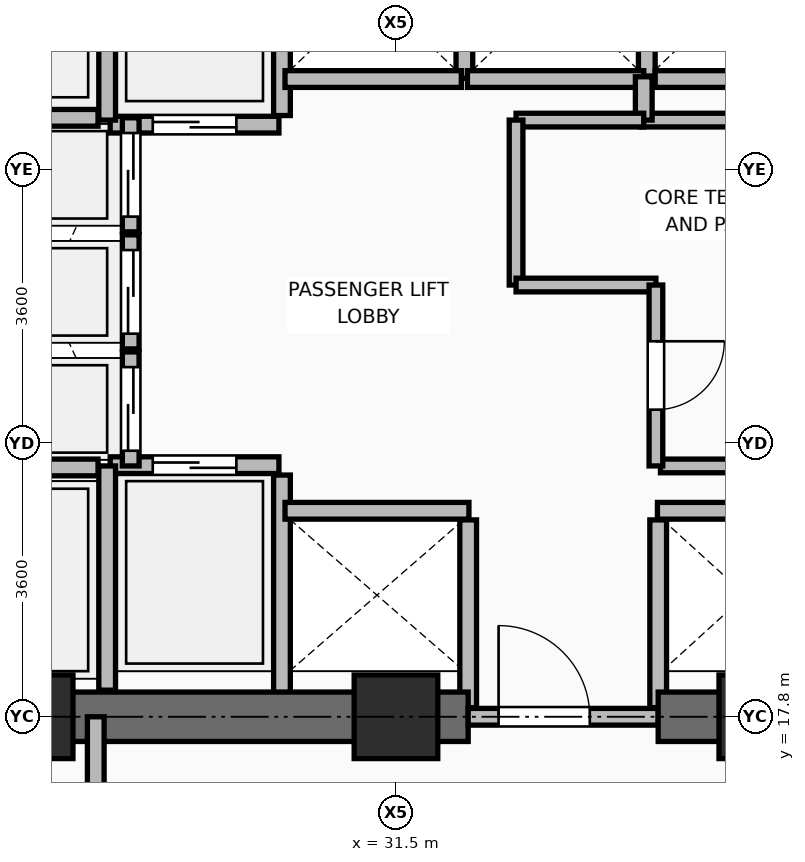
"""IFC4 building model, lengths in metres.
Left out: names, types, materials, properties, quantities, classifications, styles, units other than length and angle.
Written with IfcOpenShell. Run it as: python <this file> out.ifc"""

import sys

from ifc_helpers import new_model, si_unit, direction, frame, frame_2d, origin, origin_2d, place, context, subcontext, project, spatial, rectangle, extrude, element, fill, save


model = new_model("IFC4")
c1 = context("Model", 3, precision=1e-05, world=origin(), true_north=direction((0.0, 1.0)))
c2 = subcontext(c1, "Body", "Model", "MODEL_VIEW")
j1 = project(units=[si_unit("LENGTHUNIT", "METRE"), si_unit("PLANEANGLEUNIT", "RADIAN")], contexts=[c1])
p1 = place(None, origin())
s1 = spatial("IfcSite", under=j1, at=p1, CompositionType="ELEMENT")
p2 = place(p1, origin())
s2 = spatial("IfcBuilding", under=s1, at=p2, CompositionType="ELEMENT")
p3 = place(p2, frame((0.0, 0.0, 83.25)))
s3 = spatial("IfcBuildingStorey", under=s2, at=p3, CompositionType="ELEMENT", Elevation=83.25)
for number, where, z_axis, x_axis in (
    (1, (26.7, 17.8, 0.0), (0.0, 0.0, 1.0), (1.0, 0.0, 0.0)),
    (2, (31.5, 17.8, 0.0), (0.0, 0.0, 1.0), (1.0, 0.0, 0.0)),
    (3, (36.3, 17.8, 0.0), (0.0, 0.0, 1.0), (1.0, 0.0, 0.0)),
):
    element("IfcColumn", number, at=place(p3, frame(where, z_axis=z_axis, x_axis=x_axis)), inside=s3, PredefinedType="COLUMN", context=c2, shape_type="SweptSolid", body=[
        extrude(rectangle(XDim=1.1, YDim=1.1, at=origin_2d()), origin(), (0.0, 0.0, 1.0), 3.75),
    ])
p4 = place(p3, frame((30.0, 18.08, 0.0), z_axis=(0.0, 0.0, 1.0), x_axis=(0.0, 1.0, 0.0)))
e4 = element("IfcWall", 4, at=p4, inside=s3, PredefinedType="PARTITIONING", context=c2, shape_type="SweptSolid", body=[
    extrude(rectangle(XDim=2.9, YDim=0.22, at=frame_2d((1.45, 0.0))), origin(), (0.0, 0.0, 1.0), 3.545),
])
for number, where, z_axis, x_axis in (
    (5, (32.45, 17.92, 0.0), (0.0, 0.0, 1.0), (0.0, 1.0, 0.0)),
    (6, (34.95, 17.92, 0.0), (0.0, 0.0, 1.0), (0.0, 1.0, 0.0)),
):
    element("IfcWall", number, at=place(p3, frame(where, z_axis=z_axis, x_axis=x_axis)), inside=s3, PredefinedType="PARTITIONING", context=c2, shape_type="SweptSolid", body=[
        extrude(rectangle(XDim=2.47, YDim=0.22, at=frame_2d((1.235, 0.0))), origin(), (0.0, 0.0, 1.0), 2.928),
    ])
p5 = place(p3, frame((30.0, 25.71, 0.0), z_axis=(0.0, 0.0, 1.0), x_axis=(0.0, 1.0, 0.0)))
e7 = element("IfcWall", 7, at=p5, inside=s3, PredefinedType="PARTITIONING", context=c2, shape_type="SweptSolid", body=[
    extrude(rectangle(XDim=2.73, YDim=0.22, at=frame_2d((1.365, 0.0))), origin(), (0.0, 0.0, 1.0), 3.545),
])
p6 = place(p3, frame((32.4, 26.2, 0.0), z_axis=(0.0, 0.0, 1.0), x_axis=(0.0, 1.0, 0.0)))
e8 = element("IfcWall", 8, at=p6, inside=s3, PredefinedType="PARTITIONING", context=c2, shape_type="SweptSolid", body=[
    extrude(rectangle(XDim=2.24, YDim=0.22, at=frame_2d((1.12, 0.0))), origin(), (0.0, 0.0, 1.0), 3.545),
])
p7 = place(p3, frame((34.8, 26.23, 0.0), z_axis=(0.0, 0.0, 1.0), x_axis=(0.0, 1.0, 0.0)))
e9 = element("IfcWall", 9, at=p7, inside=s3, PredefinedType="PARTITIONING", context=c2, shape_type="SweptSolid", body=[
    extrude(rectangle(XDim=2.21, YDim=0.22, at=frame_2d((1.105, 0.0))), origin(), (0.0, 0.0, 1.0), 3.545),
])
p8 = place(p3, frame((34.91, 26.19, 0.0), z_axis=(0.0, 0.0, 1.0), x_axis=(1.0, 0.0, 0.0)))
e10 = element("IfcWall", 10, at=p8, inside=s3, PredefinedType="PARTITIONING", context=c2, shape_type="SweptSolid", body=[
    extrude(rectangle(XDim=2.14, YDim=0.22, at=frame_2d((1.07, 0.0))), origin(), (0.0, 0.0, 1.0), 3.545),
])
p9 = place(p3, frame((25.55, 17.8, 0.0), z_axis=(0.0, 0.0, 1.0), x_axis=(1.0, 0.0, 0.0)))
e11 = element("IfcWall", 11, at=p9, inside=s3, PredefinedType="SHEAR", context=c2, shape_type="SweptSolid", body=[
    extrude(rectangle(XDim=6.9, YDim=0.65, at=frame_2d((3.45, 0.0))), origin(), (0.0, 0.0, 1.0), 3.57),
])
p10 = place(p3, frame((32.45, 17.8, 0.0), z_axis=(0.0, 0.0, 1.0), x_axis=(1.0, 0.0, 0.0)))
e12 = element("IfcWall", 12, at=p10, inside=s3, PredefinedType="PARTITIONING", context=c2, shape_type="SweptSolid", body=[
    extrude(rectangle(XDim=2.5, YDim=0.22, at=frame_2d((1.25, 0.0))), origin(), (0.0, 0.0, 1.0), 2.928),
])
p11 = place(p10, frame((0.4, 0.0, 0.0)))
e13 = element("IfcOpeningElement", 13, at=p11, cuts=e12, PredefinedType="OPENING", context=c2, shape_type="SweptSolid", body=[
    extrude(rectangle(XDim=1.2, YDim=2.1, at=frame_2d((0.6, 1.05))), frame((0.0, 0.12, 0.0), z_axis=(0.0, -1.0, 0.0), x_axis=(1.0, 0.0, 0.0)), (0.0, 0.0, 1.0), 0.24),
])
p12 = place(p3, frame((34.95, 17.8, 0.0), z_axis=(0.0, 0.0, 1.0), x_axis=(1.0, 0.0, 0.0)))
e14 = element("IfcWall", 14, at=p12, inside=s3, PredefinedType="SHEAR", context=c2, shape_type="SweptSolid", body=[
    extrude(rectangle(XDim=6.475, YDim=0.65, at=frame_2d((3.238, 0.0))), origin(), (0.0, 0.0, 1.0), 3.57),
])
p13 = place(p3, frame((27.74, 21.11, 0.0), z_axis=(0.0, 0.0, 1.0), x_axis=(1.0, 0.0, 0.0)))
e15 = element("IfcWall", 15, at=p13, inside=s3, PredefinedType="PARTITIONING", context=c2, shape_type="SweptSolid", body=[
    extrude(rectangle(XDim=2.22, YDim=0.22, at=frame_2d((1.11, 0.0))), origin(), (0.0, 0.0, 1.0), 3.55),
])
p14 = place(p13, frame((0.56, 0.0, 0.0)))
e16 = element("IfcOpeningElement", 16, at=p14, cuts=e15, PredefinedType="OPENING", context=c2, shape_type="SweptSolid", body=[
    extrude(rectangle(XDim=1.1, YDim=2.2, at=frame_2d((0.55, 1.1))), frame((0.0, 0.12, 0.0), z_axis=(0.0, -1.0, 0.0), x_axis=(1.0, 0.0, 0.0)), (0.0, 0.0, 1.0), 0.24),
])
p15 = place(p3, frame((27.74, 25.59, 0.0), z_axis=(0.0, 0.0, 1.0), x_axis=(1.0, 0.0, 0.0)))
e17 = element("IfcWall", 17, at=p15, inside=s3, PredefinedType="PARTITIONING", context=c2, shape_type="SweptSolid", body=[
    extrude(rectangle(XDim=2.22, YDim=0.22, at=frame_2d((1.11, 0.0))), origin(), (0.0, 0.0, 1.0), 3.55),
])
p16 = place(p15, frame((0.56, 0.0, 0.0)))
e18 = element("IfcOpeningElement", 18, at=p16, cuts=e17, PredefinedType="OPENING", context=c2, shape_type="SweptSolid", body=[
    extrude(rectangle(XDim=1.1, YDim=2.2, at=frame_2d((0.55, 1.1))), frame((0.0, 0.12, 0.0), z_axis=(0.0, -1.0, 0.0), x_axis=(1.0, 0.0, 0.0)), (0.0, 0.0, 1.0), 0.24),
])
p17 = place(p3, frame((30.04, 20.51, 0.0), z_axis=(0.0, 0.0, 1.0), x_axis=(1.0, 0.0, 0.0)))
e19 = element("IfcWall", 19, at=p17, inside=s3, PredefinedType="PARTITIONING", context=c2, shape_type="SweptSolid", body=[
    extrude(rectangle(XDim=2.42, YDim=0.22, at=frame_2d((1.21, 0.0))), origin(), (0.0, 0.0, 1.0), 3.55),
])
p18 = place(p3, frame((34.94, 20.51, 0.0), z_axis=(0.0, 0.0, 1.0), x_axis=(1.0, 0.0, 0.0)))
e20 = element("IfcWall", 20, at=p18, inside=s3, PredefinedType="PARTITIONING", context=c2, shape_type="SweptSolid", body=[
    extrude(rectangle(XDim=2.24, YDim=0.22, at=frame_2d((1.12, 0.0))), origin(), (0.0, 0.0, 1.0), 3.55),
])
for number, where, z_axis, x_axis in (
    (21, (30.04, 26.19, 0.0), (0.0, 0.0, 1.0), (1.0, 0.0, 0.0)),
    (22, (32.44, 26.19, 0.0), (0.0, 0.0, 1.0), (1.0, 0.0, 0.0)),
):
    element("IfcWall", number, at=place(p3, frame(where, z_axis=z_axis, x_axis=x_axis)), inside=s3, PredefinedType="PARTITIONING", context=c2, shape_type="SweptSolid", body=[
        extrude(rectangle(XDim=2.32, YDim=0.22, at=frame_2d((1.16, 0.0))), origin(), (0.0, 0.0, 1.0), 3.55),
    ])
p19 = place(p3, frame((28.01, 21.1, 0.0), z_axis=(0.0, 0.0, 1.0), x_axis=(0.0, 1.0, 0.0)))
e23 = element("IfcWall", 23, at=p19, inside=s3, PredefinedType="PARTITIONING", context=c2, shape_type="SweptSolid", body=[
    extrude(rectangle(XDim=1.5, YDim=0.22, at=frame_2d((0.75, 0.0))), origin(), (0.0, 0.0, 1.0), 3.55),
])
p20 = place(p19, frame((0.2, 0.0, 0.0)))
e24 = element("IfcOpeningElement", 24, at=p20, cuts=e23, PredefinedType="OPENING", context=c2, shape_type="SweptSolid", body=[
    extrude(rectangle(XDim=1.1, YDim=2.2, at=frame_2d((0.55, 1.1))), frame((0.0, 0.12, 0.0), z_axis=(0.0, -1.0, 0.0), x_axis=(1.0, 0.0, 0.0)), (0.0, 0.0, 1.0), 0.24),
])
p21 = place(p3, frame((28.01, 22.64, 0.0), z_axis=(0.0, 0.0, 1.0), x_axis=(0.0, 1.0, 0.0)))
e25 = element("IfcWall", 25, at=p21, inside=s3, PredefinedType="PARTITIONING", context=c2, shape_type="SweptSolid", body=[
    extrude(rectangle(XDim=1.5, YDim=0.22, at=frame_2d((0.75, 0.0))), origin(), (0.0, 0.0, 1.0), 3.55),
])
p22 = place(p21, frame((0.2, 0.0, 0.0)))
e26 = element("IfcOpeningElement", 26, at=p22, cuts=e25, PredefinedType="OPENING", context=c2, shape_type="SweptSolid", body=[
    extrude(rectangle(XDim=1.1, YDim=2.2, at=frame_2d((0.55, 1.1))), frame((0.0, 0.12, 0.0), z_axis=(0.0, -1.0, 0.0), x_axis=(1.0, 0.0, 0.0)), (0.0, 0.0, 1.0), 0.24),
])
p23 = place(p3, frame((28.01, 24.18, 0.0), z_axis=(0.0, 0.0, 1.0), x_axis=(0.0, 1.0, 0.0)))
e27 = element("IfcWall", 27, at=p23, inside=s3, PredefinedType="PARTITIONING", context=c2, shape_type="SweptSolid", body=[
    extrude(rectangle(XDim=1.5, YDim=0.22, at=frame_2d((0.75, 0.0))), origin(), (0.0, 0.0, 1.0), 3.55),
])
p24 = place(p23, frame((0.2, 0.0, 0.0)))
e28 = element("IfcOpeningElement", 28, at=p24, cuts=e27, PredefinedType="OPENING", context=c2, shape_type="SweptSolid", body=[
    extrude(rectangle(XDim=1.1, YDim=2.2, at=frame_2d((0.55, 1.1))), frame((0.0, 0.12, 0.0), z_axis=(0.0, -1.0, 0.0), x_axis=(1.0, 0.0, 0.0)), (0.0, 0.0, 1.0), 0.24),
])
p25 = place(p3, frame((27.7, 18.15, 0.0), z_axis=(0.0, 0.0, 1.0), x_axis=(0.0, 1.0, 0.0)))
e29 = element("IfcWall", 29, at=p25, inside=s3, PredefinedType="PARTITIONING", context=c2, shape_type="SweptSolid", body=[
    extrude(rectangle(XDim=2.95, YDim=0.22, at=frame_2d((1.475, 0.0))), origin(), (0.0, 0.0, 1.0), 3.55),
])
p26 = place(p3, frame((27.7, 25.65, 0.0), z_axis=(0.0, 0.0, 1.0), x_axis=(0.0, 1.0, 0.0)))
e30 = element("IfcWall", 30, at=p26, inside=s3, PredefinedType="PARTITIONING", context=c2, shape_type="SweptSolid", body=[
    extrude(rectangle(XDim=3.0, YDim=0.22, at=frame_2d((1.5, 0.0))), origin(), (0.0, 0.0, 1.0), 3.55),
])
for number, where, z_axis, x_axis in (
    (31, (25.88, 21.08, 0.0), (0.0, 0.0, 1.0), (1.0, 0.0, 0.0)),
    (32, (25.88, 25.68, 0.0), (0.0, 0.0, 1.0), (1.0, 0.0, 0.0)),
):
    element("IfcWall", number, at=place(p3, frame(where, z_axis=z_axis, x_axis=x_axis)), inside=s3, PredefinedType="PARTITIONING", context=c2, shape_type="SweptSolid", body=[
        extrude(rectangle(XDim=1.7, YDim=0.22, at=frame_2d((0.85, 0.0))), origin(), (0.0, 0.0, 1.0), 3.55),
    ])
p27 = place(p3, frame((34.98, 21.1, 0.0), z_axis=(0.0, 0.0, 1.0), x_axis=(1.0, 0.0, 0.0)))
e33 = element("IfcWall", 33, at=p27, inside=s3, PredefinedType="PARTITIONING", context=c2, shape_type="SweptSolid", body=[
    extrude(rectangle(XDim=2.08, YDim=0.18, at=frame_2d((1.04, 0.0))), origin(), (0.0, 0.0, 1.0), 3.55),
])
p28 = place(p3, frame((34.72, 25.65, 0.0), z_axis=(0.0, 0.0, 1.0), x_axis=(1.0, 0.0, 0.0)))
e34 = element("IfcWall", 34, at=p28, inside=s3, PredefinedType="PARTITIONING", context=c2, shape_type="SweptSolid", body=[
    extrude(rectangle(XDim=2.34, YDim=0.18, at=frame_2d((1.17, 0.0))), origin(), (0.0, 0.0, 1.0), 3.55),
])
p29 = place(p3, frame((34.76, 25.65, 0.0), z_axis=(0.0, 0.0, 1.0), x_axis=(0.0, 1.0, 0.0)))
e35 = element("IfcWall", 35, at=p29, inside=s3, PredefinedType="PARTITIONING", context=c2, shape_type="SweptSolid", body=[
    extrude(rectangle(XDim=0.57, YDim=0.22, at=frame_2d((0.285, 0.0))), origin(), (0.0, 0.0, 1.0), 3.55),
])
p30 = place(p3, frame((33.08, 25.65, 0.0), z_axis=(0.0, 0.0, 1.0), x_axis=(1.0, 0.0, 0.0)))
e36 = element("IfcWall", 36, at=p30, inside=s3, PredefinedType="PARTITIONING", context=c2, shape_type="SweptSolid", body=[
    extrude(rectangle(XDim=1.68, YDim=0.18, at=frame_2d((0.84, 0.0))), origin(), (0.0, 0.0, 1.0), 3.55),
])
p31 = place(p3, frame((33.08, 23.48, 0.0), z_axis=(0.0, 0.0, 1.0), x_axis=(0.0, 1.0, 0.0)))
e37 = element("IfcWall", 37, at=p31, inside=s3, PredefinedType="PARTITIONING", context=c2, shape_type="SweptSolid", body=[
    extrude(rectangle(XDim=2.17, YDim=0.18, at=frame_2d((1.085, 0.0))), origin(), (0.0, 0.0, 1.0), 3.55),
])
p32 = place(p3, frame((33.08, 23.48, 0.0), z_axis=(0.0, 0.0, 1.0), x_axis=(1.0, 0.0, 0.0)))
e38 = element("IfcWall", 38, at=p32, inside=s3, PredefinedType="PARTITIONING", context=c2, shape_type="SweptSolid", body=[
    extrude(rectangle(XDim=1.84, YDim=0.18, at=frame_2d((0.92, 0.0))), origin(), (0.0, 0.0, 1.0), 3.55),
])
p33 = place(p3, frame((34.92, 21.1, 0.0), z_axis=(0.0, 0.0, 1.0), x_axis=(0.0, 1.0, 0.0)))
e39 = element("IfcWall", 39, at=p33, inside=s3, PredefinedType="PARTITIONING", context=c2, shape_type="SweptSolid", body=[
    extrude(rectangle(XDim=2.38, YDim=0.18, at=frame_2d((1.19, 0.0))), origin(), (0.0, 0.0, 1.0), 3.55),
])
p34 = place(p33, frame((0.74, 0.0, 0.0)))
e40 = element("IfcOpeningElement", 40, at=p34, cuts=e39, PredefinedType="OPENING", context=c2, shape_type="SweptSolid", body=[
    extrude(rectangle(XDim=0.9, YDim=2.1, at=frame_2d((0.45, 1.05))), frame((0.0, 0.1, 0.0), z_axis=(0.0, -1.0, 0.0), x_axis=(1.0, 0.0, 0.0)), (0.0, 0.0, 1.0), 0.2),
])
p35 = place(p3, frame((27.55, 14.35, 0.0), z_axis=(0.0, 0.0, 1.0), x_axis=(0.0, 1.0, 0.0)))
e41 = element("IfcWall", 41, at=p35, inside=s3, PredefinedType="PARTITIONING", context=c2, shape_type="SweptSolid", body=[
    extrude(rectangle(XDim=3.45, YDim=0.22, at=frame_2d((1.725, 0.0))), origin(), (0.0, 0.0, 1.0), 2.928),
])
p36 = place(p35, frame((1.175, 0.0, 0.0)))
e42 = element("IfcOpeningElement", 42, at=p36, cuts=e41, PredefinedType="OPENING", context=c2, shape_type="SweptSolid", body=[
    extrude(rectangle(XDim=1.1, YDim=2.1, at=frame_2d((0.55, 1.05))), frame((0.0, 0.12, 0.0), z_axis=(0.0, -1.0, 0.0), x_axis=(1.0, 0.0, 0.0)), (0.0, 0.0, 1.0), 0.24),
])
p37 = place(p11, origin())
e43 = element("IfcDoor", 43, at=p37, inside=s3, OperationType="SINGLE_SWING_LEFT", PredefinedType="DOOR", context=c2, shape_type="SweptSolid", body=[
    extrude(rectangle(XDim=1.2, YDim=2.1, at=frame_2d((0.6, 1.05))), frame((0.0, 0.025, 0.0), z_axis=(0.0, -1.0, 0.0), x_axis=(1.0, 0.0, 0.0)), (0.0, 0.0, 1.0), 0.05),
])
fill(e13, e43)
p38 = place(p14, origin())
e44 = element("IfcDoor", 44, at=p38, inside=s3, OperationType="DOUBLE_DOOR_SLIDING", PredefinedType="DOOR", context=c2, shape_type="SweptSolid", body=[
    extrude(rectangle(XDim=1.1, YDim=2.2, at=frame_2d((0.55, 1.1))), frame((0.0, 0.025, 0.0), z_axis=(0.0, -1.0, 0.0), x_axis=(1.0, 0.0, 0.0)), (0.0, 0.0, 1.0), 0.05),
])
fill(e16, e44)
p39 = place(p16, frame((1.1, 0.0, 0.0), z_axis=(0.0, 0.0, 1.0), x_axis=(-1.0, 0.0, 0.0)))
e45 = element("IfcDoor", 45, at=p39, inside=s3, OperationType="DOUBLE_DOOR_SLIDING", PredefinedType="DOOR", context=c2, shape_type="SweptSolid", body=[
    extrude(rectangle(XDim=1.1, YDim=2.2, at=frame_2d((0.55, 1.1))), frame((0.0, 0.025, 0.0), z_axis=(0.0, -1.0, 0.0), x_axis=(1.0, 0.0, 0.0)), (0.0, 0.0, 1.0), 0.05),
])
fill(e18, e45)
p40 = place(p20, frame((1.1, 0.0, 0.0), z_axis=(0.0, 0.0, 1.0), x_axis=(-1.0, 0.0, 0.0)))
e46 = element("IfcDoor", 46, at=p40, inside=s3, OperationType="DOUBLE_DOOR_SLIDING", PredefinedType="DOOR", context=c2, shape_type="SweptSolid", body=[
    extrude(rectangle(XDim=1.1, YDim=2.2, at=frame_2d((0.55, 1.1))), frame((0.0, 0.025, 0.0), z_axis=(0.0, -1.0, 0.0), x_axis=(1.0, 0.0, 0.0)), (0.0, 0.0, 1.0), 0.05),
])
fill(e24, e46)
p41 = place(p22, frame((1.1, 0.0, 0.0), z_axis=(0.0, 0.0, 1.0), x_axis=(-1.0, 0.0, 0.0)))
e47 = element("IfcDoor", 47, at=p41, inside=s3, OperationType="DOUBLE_DOOR_SLIDING", PredefinedType="DOOR", context=c2, shape_type="SweptSolid", body=[
    extrude(rectangle(XDim=1.1, YDim=2.2, at=frame_2d((0.55, 1.1))), frame((0.0, 0.025, 0.0), z_axis=(0.0, -1.0, 0.0), x_axis=(1.0, 0.0, 0.0)), (0.0, 0.0, 1.0), 0.05),
])
fill(e26, e47)
p42 = place(p24, frame((1.1, 0.0, 0.0), z_axis=(0.0, 0.0, 1.0), x_axis=(-1.0, 0.0, 0.0)))
e48 = element("IfcDoor", 48, at=p42, inside=s3, OperationType="DOUBLE_DOOR_SLIDING", PredefinedType="DOOR", context=c2, shape_type="SweptSolid", body=[
    extrude(rectangle(XDim=1.1, YDim=2.2, at=frame_2d((0.55, 1.1))), frame((0.0, 0.025, 0.0), z_axis=(0.0, -1.0, 0.0), x_axis=(1.0, 0.0, 0.0)), (0.0, 0.0, 1.0), 0.05),
])
fill(e28, e48)
p43 = place(p34, frame((0.9, 0.0, 0.0), z_axis=(0.0, 0.0, 1.0), x_axis=(-1.0, 0.0, 0.0)))
e49 = element("IfcDoor", 49, at=p43, inside=s3, OperationType="SINGLE_SWING_LEFT", PredefinedType="DOOR", context=c2, shape_type="SweptSolid", body=[
    extrude(rectangle(XDim=0.9, YDim=2.1, at=frame_2d((0.45, 1.05))), frame((0.0, 0.025, 0.0), z_axis=(0.0, -1.0, 0.0), x_axis=(1.0, 0.0, 0.0)), (0.0, 0.0, 1.0), 0.05),
])
fill(e40, e49)
save(model, sys.argv[1])
